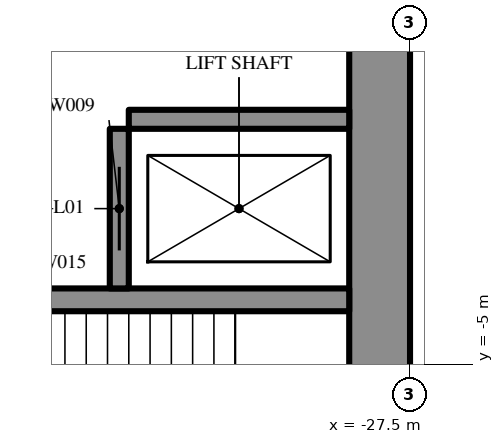
"""IFC4 building model, lengths in metres.
Left out: names, types, materials, properties, quantities, classifications, styles, units other than length and angle.
Written with IfcOpenShell. Run it as: python <this file> out.ifc"""

import sys

from ifc_helpers import new_model, si_unit, direction, frame, frame_2d, origin, place, context, subcontext, project, spatial, rectangle, extrude, element, fill, save


model = new_model("IFC4")
c1 = context("Model", 3, precision=1e-05, world=origin(), true_north=direction((0.0, 1.0)))
c2 = subcontext(c1, "Body", "Model", "MODEL_VIEW")
j1 = project(units=[si_unit("LENGTHUNIT", "METRE"), si_unit("PLANEANGLEUNIT", "RADIAN")], contexts=[c1])
p1 = place(None, origin())
s1 = spatial("IfcSite", under=j1, at=p1, CompositionType="ELEMENT")
p2 = place(p1, origin())
s2 = spatial("IfcBuilding", under=s1, at=p2, CompositionType="ELEMENT")
p3 = place(p2, frame((0.0, 0.0, 7.2)))
s3 = spatial("IfcBuildingStorey", under=s2, at=p3, CompositionType="ELEMENT", Elevation=7.2)
p4 = place(p3, frame((-27.9, 8.6, 0.0), z_axis=(0.0, 0.0, 1.0), x_axis=(0.0, -1.0, 0.0)))
e1 = element("IfcWall", 1, at=p4, inside=s3, PredefinedType="SHEAR", context=c2, shape_type="SweptSolid", body=[
    extrude(rectangle(XDim=17.2, YDim=0.8, at=frame_2d((8.6, 0.0))), origin(), (0.0, 0.0, 1.0), 5.4),
])
p5 = place(p3, frame((-28.3, -4.15, 0.0), z_axis=(0.0, 0.0, 1.0), x_axis=(-1.0, 0.0, 0.0)))
e2 = element("IfcWall", 2, at=p5, inside=s3, PredefinedType="SHEAR", context=c2, shape_type="SweptSolid", body=[
    extrude(rectangle(XDim=8.4, YDim=0.3, at=frame_2d((4.2, 0.0))), origin(), (0.0, 0.0, 1.0), 5.4),
])
p6 = place(p3, frame((-31.325, -1.9, 0.0), z_axis=(0.0, 0.0, 1.0), x_axis=(0.0, -1.0, 0.0)))
e3 = element("IfcWall", 3, at=p6, inside=s3, PredefinedType="SHEAR", context=c2, shape_type="SweptSolid", body=[
    extrude(rectangle(XDim=2.1, YDim=0.25, at=frame_2d((1.05, 0.0))), origin(), (0.0, 0.0, 1.0), 5.4),
])
p7 = place(p6, frame((0.5, 0.0, 0.0)))
e4 = element("IfcOpeningElement", 4, at=p7, cuts=e3, PredefinedType="OPENING", context=c2, shape_type="SweptSolid", body=[
    extrude(rectangle(XDim=1.1, YDim=2.2, at=frame_2d((0.55, 1.1))), frame((0.0, 0.135, 0.0), z_axis=(0.0, -1.0, 0.0), x_axis=(1.0, 0.0, 0.0)), (0.0, 0.0, 1.0), 0.27),
])
p8 = place(p3, frame((-28.3, -1.775, 0.0), z_axis=(0.0, 0.0, 1.0), x_axis=(-1.0, 0.0, 0.0)))
e5 = element("IfcWall", 5, at=p8, inside=s3, PredefinedType="SHEAR", context=c2, shape_type="SweptSolid", body=[
    extrude(rectangle(XDim=2.9, YDim=0.25, at=frame_2d((1.45, 0.0))), origin(), (0.0, 0.0, 1.0), 5.4),
])
p9 = place(p3, frame((-27.2, 14.3, 0.0), z_axis=(0.0, 0.0, 1.0), x_axis=(-0.866026593062, -0.499997940104, 0.0)))
e6 = element("IfcWall", 6, at=p9, inside=s3, PredefinedType="SHEAR", context=c2, shape_type="SweptSolid", body=[
    extrude(rectangle(XDim=28.946, YDim=2.0, at=frame_2d((14.473, 0.0))), origin(), (0.0, 0.0, 1.0), 5.4),
])
p10 = place(p9, frame((4.6, 0.0, 0.0)))
e7 = element("IfcOpeningElement", 7, at=p10, cuts=e6, PredefinedType="OPENING", context=c2, shape_type="SweptSolid", body=[
    extrude(rectangle(XDim=1.0, YDim=2.2, at=frame_2d((0.5, 1.1))), frame((0.0, 1.01, 0.0), z_axis=(0.0, -1.0, 0.0), x_axis=(1.0, 0.0, 0.0)), (0.0, 0.0, 1.0), 2.02),
])
p11 = place(p9, frame((13.395, 0.0, 0.0)))
e8 = element("IfcOpeningElement", 8, at=p11, cuts=e6, PredefinedType="OPENING", context=c2, shape_type="SweptSolid", body=[
    extrude(rectangle(XDim=1.8, YDim=2.2, at=frame_2d((0.9, 1.1))), frame((0.0, 1.01, 0.0), z_axis=(0.0, -1.0, 0.0), x_axis=(1.0, 0.0, 0.0)), (0.0, 0.0, 1.0), 2.02),
])
p12 = place(p3, frame((-27.2, -14.3, 0.0), z_axis=(0.0, 0.0, 1.0), x_axis=(-0.866024044937, 0.500002353585, 0.0)))
e9 = element("IfcWall", 9, at=p12, inside=s3, PredefinedType="SHEAR", context=c2, shape_type="SweptSolid", body=[
    extrude(rectangle(XDim=27.533, YDim=2.0, at=frame_2d((13.767, 0.0))), origin(), (0.0, 0.0, 1.0), 5.4),
])
p13 = place(p12, frame((4.6, 0.0, 0.0)))
e10 = element("IfcOpeningElement", 10, at=p13, cuts=e9, PredefinedType="OPENING", context=c2, shape_type="SweptSolid", body=[
    extrude(rectangle(XDim=1.0, YDim=2.2, at=frame_2d((0.5, 1.1))), frame((0.0, 1.01, 0.0), z_axis=(0.0, -1.0, 0.0), x_axis=(1.0, 0.0, 0.0)), (0.0, 0.0, 1.0), 2.02),
])
p14 = place(p12, frame((13.395, 0.0, 0.0)))
e11 = element("IfcOpeningElement", 11, at=p14, cuts=e9, PredefinedType="OPENING", context=c2, shape_type="SweptSolid", body=[
    extrude(rectangle(XDim=1.8, YDim=2.2, at=frame_2d((0.9, 1.1))), frame((0.0, 1.01, 0.0), z_axis=(0.0, -1.0, 0.0), x_axis=(1.0, 0.0, 0.0)), (0.0, 0.0, 1.0), 2.02),
])
p15 = place(p7, origin())
e12 = element("IfcDoor", 12, at=p15, inside=s3, OperationType="SLIDING_TO_LEFT", PredefinedType="USERDEFINED", context=c2, shape_type="SweptSolid", body=[
    extrude(rectangle(XDim=1.1, YDim=2.2, at=frame_2d((0.55, 1.1))), frame((0.0, 0.025, 0.0), z_axis=(0.0, -1.0, 0.0), x_axis=(1.0, 0.0, 0.0)), (0.0, 0.0, 1.0), 0.05),
])
fill(e4, e12)
save(model, sys.argv[1])
